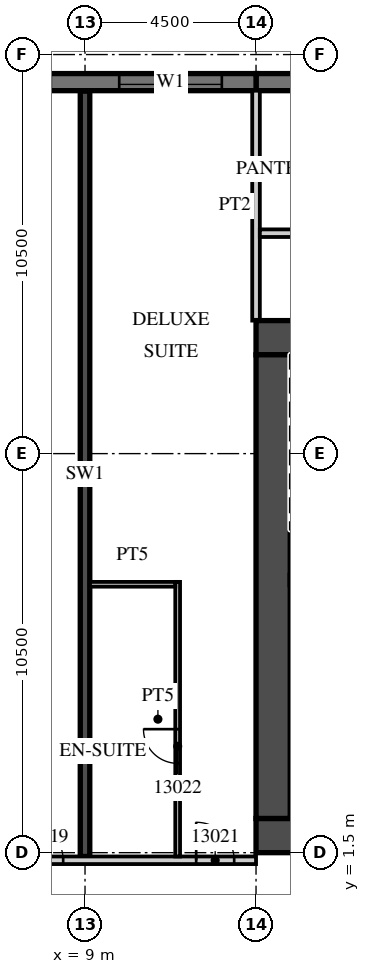
"""IFC4 building model, lengths in metres.
Left out: names, types, materials, properties, quantities, classifications, styles, units other than length and angle.
Written with IfcOpenShell. Run it as: python <this file> out.ifc"""

import sys

from ifc_helpers import new_model, si_unit, direction, frame, frame_2d, origin, place, context, subcontext, project, spatial, rectangle, extrude, element, fill, save


model = new_model("IFC4")
c1 = context("Model", 3, precision=1e-05, world=origin(), true_north=direction((0.0, 1.0)))
c2 = subcontext(c1, "Body", "Model", "MODEL_VIEW")
j1 = project(units=[si_unit("LENGTHUNIT", "METRE"), si_unit("PLANEANGLEUNIT", "RADIAN")], contexts=[c1])
p1 = place(None, origin())
s1 = spatial("IfcSite", under=j1, at=p1, CompositionType="ELEMENT")
p2 = place(p1, origin())
s2 = spatial("IfcBuilding", under=s1, at=p2, CompositionType="ELEMENT")
p3 = place(p2, frame((0.0, 0.0, 73.2)))
s3 = spatial("IfcBuildingStorey", under=s2, at=p3, CompositionType="ELEMENT", Elevation=73.2)
p4 = place(p3, frame((9.0, 1.4, 0.0), z_axis=(0.0, 0.0, 1.0), x_axis=(0.0, 1.0, 0.0)))
e1 = element("IfcWall", 1, at=p4, inside=s3, PredefinedType="SHEAR", context=c2, shape_type="SweptSolid", body=[
    extrude(rectangle(XDim=20.14, YDim=0.25, at=frame_2d((10.07, 0.0))), origin(), (0.0, 0.0, 1.0), 3.3),
])
p5 = place(p3, frame((31.5, 21.775, 0.0), z_axis=(0.0, 0.0, 1.0), x_axis=(-1.0, 0.0, 0.0)))
e2 = element("IfcWall", 2, at=p5, inside=s3, PredefinedType="SOLIDWALL", context=c2, shape_type="SweptSolid", body=[
    extrude(rectangle(XDim=18.0, YDim=0.45, at=frame_2d((9.0, 0.0))), origin(), (0.0, 0.0, 1.0), 3.02),
])
p6 = place(p3, frame((13.5, 21.775, 0.0), z_axis=(0.0, 0.0, 1.0), x_axis=(-1.0, 0.0, 0.0)))
e3 = element("IfcWall", 3, at=p6, inside=s3, PredefinedType="SOLIDWALL", context=c2, shape_type="SweptSolid", body=[
    extrude(rectangle(XDim=54.5, YDim=0.45, at=frame_2d((27.25, 0.0))), origin(), (0.0, 0.0, 1.0), 3.02),
])
p7 = place(p6, frame((0.9, 0.0, 0.45)))
e4 = element("IfcOpeningElement", 4, at=p7, cuts=e3, PredefinedType="OPENING", context=c2, shape_type="SweptSolid", body=[
    extrude(rectangle(XDim=2.7, YDim=2.25, at=frame_2d((1.35, 1.125))), frame((0.0, 0.235, 0.0), z_axis=(0.0, -1.0, 0.0), x_axis=(1.0, 0.0, 0.0)), (0.0, 0.0, 1.0), 0.47),
])
p8 = place(p6, frame((5.4, 0.0, 0.45)))
e5 = element("IfcOpeningElement", 5, at=p8, cuts=e3, PredefinedType="OPENING", context=c2, shape_type="SweptSolid", body=[
    extrude(rectangle(XDim=2.7, YDim=2.25, at=frame_2d((1.35, 1.125))), frame((0.0, 0.235, 0.0), z_axis=(0.0, -1.0, 0.0), x_axis=(1.0, 0.0, 0.0)), (0.0, 0.0, 1.0), 0.47),
])
p9 = place(p6, frame((9.9, 0.0, 0.45)))
e6 = element("IfcOpeningElement", 6, at=p9, cuts=e3, PredefinedType="OPENING", context=c2, shape_type="SweptSolid", body=[
    extrude(rectangle(XDim=2.7, YDim=2.25, at=frame_2d((1.35, 1.125))), frame((0.0, 0.235, 0.0), z_axis=(0.0, -1.0, 0.0), x_axis=(1.0, 0.0, 0.0)), (0.0, 0.0, 1.0), 0.47),
])
p10 = place(p6, frame((14.4, 0.0, 0.45)))
e7 = element("IfcOpeningElement", 7, at=p10, cuts=e3, PredefinedType="OPENING", context=c2, shape_type="SweptSolid", body=[
    extrude(rectangle(XDim=2.7, YDim=2.25, at=frame_2d((1.35, 1.125))), frame((0.0, 0.235, 0.0), z_axis=(0.0, -1.0, 0.0), x_axis=(1.0, 0.0, 0.0)), (0.0, 0.0, 1.0), 0.47),
])
p11 = place(p6, frame((18.9, 0.0, 0.45)))
e8 = element("IfcOpeningElement", 8, at=p11, cuts=e3, PredefinedType="OPENING", context=c2, shape_type="SweptSolid", body=[
    extrude(rectangle(XDim=2.7, YDim=2.25, at=frame_2d((1.35, 1.125))), frame((0.0, 0.235, 0.0), z_axis=(0.0, -1.0, 0.0), x_axis=(1.0, 0.0, 0.0)), (0.0, 0.0, 1.0), 0.47),
])
p12 = place(p6, frame((23.4, 0.0, 0.45)))
e9 = element("IfcOpeningElement", 9, at=p12, cuts=e3, PredefinedType="OPENING", context=c2, shape_type="SweptSolid", body=[
    extrude(rectangle(XDim=2.7, YDim=2.25, at=frame_2d((1.35, 1.125))), frame((0.0, 0.235, 0.0), z_axis=(0.0, -1.0, 0.0), x_axis=(1.0, 0.0, 0.0)), (0.0, 0.0, 1.0), 0.47),
])
p13 = place(p6, frame((27.9, 0.0, 0.45)))
e10 = element("IfcOpeningElement", 10, at=p13, cuts=e3, PredefinedType="OPENING", context=c2, shape_type="SweptSolid", body=[
    extrude(rectangle(XDim=2.7, YDim=2.25, at=frame_2d((1.35, 1.125))), frame((0.0, 0.235, 0.0), z_axis=(0.0, -1.0, 0.0), x_axis=(1.0, 0.0, 0.0)), (0.0, 0.0, 1.0), 0.47),
])
p14 = place(p6, frame((32.4, 0.0, 0.45)))
e11 = element("IfcOpeningElement", 11, at=p14, cuts=e3, PredefinedType="OPENING", context=c2, shape_type="SweptSolid", body=[
    extrude(rectangle(XDim=2.7, YDim=2.25, at=frame_2d((1.35, 1.125))), frame((0.0, 0.235, 0.0), z_axis=(0.0, -1.0, 0.0), x_axis=(1.0, 0.0, 0.0)), (0.0, 0.0, 1.0), 0.47),
])
p15 = place(p6, frame((36.9, 0.0, 0.45)))
e12 = element("IfcOpeningElement", 12, at=p15, cuts=e3, PredefinedType="OPENING", context=c2, shape_type="SweptSolid", body=[
    extrude(rectangle(XDim=2.7, YDim=2.25, at=frame_2d((1.35, 1.125))), frame((0.0, 0.235, 0.0), z_axis=(0.0, -1.0, 0.0), x_axis=(1.0, 0.0, 0.0)), (0.0, 0.0, 1.0), 0.47),
])
p16 = place(p6, frame((41.4, 0.0, 0.45)))
e13 = element("IfcOpeningElement", 13, at=p16, cuts=e3, PredefinedType="OPENING", context=c2, shape_type="SweptSolid", body=[
    extrude(rectangle(XDim=2.7, YDim=2.25, at=frame_2d((1.35, 1.125))), frame((0.0, 0.235, 0.0), z_axis=(0.0, -1.0, 0.0), x_axis=(1.0, 0.0, 0.0)), (0.0, 0.0, 1.0), 0.47),
])
p17 = place(p6, frame((45.9, 0.0, 0.45)))
e14 = element("IfcOpeningElement", 14, at=p17, cuts=e3, PredefinedType="OPENING", context=c2, shape_type="SweptSolid", body=[
    extrude(rectangle(XDim=2.7, YDim=2.25, at=frame_2d((1.35, 1.125))), frame((0.0, 0.235, 0.0), z_axis=(0.0, -1.0, 0.0), x_axis=(1.0, 0.0, 0.0)), (0.0, 0.0, 1.0), 0.47),
])
p18 = place(p6, frame((50.4, 0.0, 0.45)))
e15 = element("IfcOpeningElement", 15, at=p18, cuts=e3, PredefinedType="OPENING", context=c2, shape_type="SweptSolid", body=[
    extrude(rectangle(XDim=2.7, YDim=2.25, at=frame_2d((1.35, 1.125))), frame((0.0, 0.235, 0.0), z_axis=(0.0, -1.0, 0.0), x_axis=(1.0, 0.0, 0.0)), (0.0, 0.0, 1.0), 0.47),
])
p19 = place(p3, frame((13.5, 15.5, 0.0), z_axis=(0.0, 0.0, 1.0), x_axis=(0.0, 1.0, 0.0)))
e16 = element("IfcWall", 16, at=p19, inside=s3, PredefinedType="PARTITIONING", context=c2, shape_type="SweptSolid", body=[
    extrude(rectangle(XDim=6.05, YDim=0.2, at=frame_2d((3.025, 0.0))), origin(), (0.0, 0.0, 1.0), 3.02),
])
p20 = place(p3, frame((-44.55, 1.3, 0.0), z_axis=(0.0, 0.0, 1.0), x_axis=(1.0, 0.0, 0.0)))
e17 = element("IfcWall", 17, at=p20, inside=s3, PredefinedType="PARTITIONING", context=c2, shape_type="SweptSolid", body=[
    extrude(rectangle(XDim=58.05, YDim=0.2, at=frame_2d((29.025, 0.0))), origin(), (0.0, 0.0, 1.0), 3.02),
])
p21 = place(p20, frame((0.525, 0.0, 0.0)))
e18 = element("IfcOpeningElement", 18, at=p21, cuts=e17, PredefinedType="OPENING", context=c2, shape_type="SweptSolid", body=[
    extrude(rectangle(XDim=1.0, YDim=2.1, at=frame_2d((0.5, 1.05))), frame((0.0, 0.11, 0.0), z_axis=(0.0, -1.0, 0.0), x_axis=(1.0, 0.0, 0.0)), (0.0, 0.0, 1.0), 0.22),
])
p22 = place(p20, frame((6.975, 0.0, 0.0)))
e19 = element("IfcOpeningElement", 19, at=p22, cuts=e17, PredefinedType="OPENING", context=c2, shape_type="SweptSolid", body=[
    extrude(rectangle(XDim=1.0, YDim=2.1, at=frame_2d((0.5, 1.05))), frame((0.0, 0.11, 0.0), z_axis=(0.0, -1.0, 0.0), x_axis=(1.0, 0.0, 0.0)), (0.0, 0.0, 1.0), 0.22),
])
p23 = place(p20, frame((9.125, 0.0, 0.0)))
e20 = element("IfcOpeningElement", 20, at=p23, cuts=e17, PredefinedType="OPENING", context=c2, shape_type="SweptSolid", body=[
    extrude(rectangle(XDim=1.0, YDim=2.1, at=frame_2d((0.5, 1.05))), frame((0.0, 0.11, 0.0), z_axis=(0.0, -1.0, 0.0), x_axis=(1.0, 0.0, 0.0)), (0.0, 0.0, 1.0), 0.22),
])
p24 = place(p20, frame((13.6, 0.0, 0.0)))
e21 = element("IfcOpeningElement", 21, at=p24, cuts=e17, PredefinedType="OPENING", context=c2, shape_type="SweptSolid", body=[
    extrude(rectangle(XDim=1.0, YDim=2.1, at=frame_2d((0.5, 1.05))), frame((0.0, 0.11, 0.0), z_axis=(0.0, -1.0, 0.0), x_axis=(1.0, 0.0, 0.0)), (0.0, 0.0, 1.0), 0.22),
])
p25 = place(p20, frame((19.987, 0.0, 0.0)))
e22 = element("IfcOpeningElement", 22, at=p25, cuts=e17, PredefinedType="OPENING", context=c2, shape_type="SweptSolid", body=[
    extrude(rectangle(XDim=1.2, YDim=2.1, at=frame_2d((0.6, 1.05))), frame((0.0, 0.11, 0.0), z_axis=(0.0, -1.0, 0.0), x_axis=(1.0, 0.0, 0.0)), (0.0, 0.0, 1.0), 0.22),
])
p26 = place(p20, frame((31.912, 0.0, 0.0)))
e23 = element("IfcOpeningElement", 23, at=p26, cuts=e17, PredefinedType="OPENING", context=c2, shape_type="SweptSolid", body=[
    extrude(rectangle(XDim=1.2, YDim=2.1, at=frame_2d((0.6, 1.05))), frame((0.0, 0.11, 0.0), z_axis=(0.0, -1.0, 0.0), x_axis=(1.0, 0.0, 0.0)), (0.0, 0.0, 1.0), 0.22),
])
p27 = place(p20, frame((38.5, 0.0, 0.0)))
e24 = element("IfcOpeningElement", 24, at=p27, cuts=e17, PredefinedType="OPENING", context=c2, shape_type="SweptSolid", body=[
    extrude(rectangle(XDim=1.0, YDim=2.1, at=frame_2d((0.5, 1.05))), frame((0.0, 0.11, 0.0), z_axis=(0.0, -1.0, 0.0), x_axis=(1.0, 0.0, 0.0)), (0.0, 0.0, 1.0), 0.22),
])
p28 = place(p20, frame((40.6, 0.0, 0.0)))
e25 = element("IfcOpeningElement", 25, at=p28, cuts=e17, PredefinedType="OPENING", context=c2, shape_type="SweptSolid", body=[
    extrude(rectangle(XDim=1.0, YDim=2.1, at=frame_2d((0.5, 1.05))), frame((0.0, 0.11, 0.0), z_axis=(0.0, -1.0, 0.0), x_axis=(1.0, 0.0, 0.0)), (0.0, 0.0, 1.0), 0.22),
])
p29 = place(p20, frame((47.5, 0.0, 0.0)))
e26 = element("IfcOpeningElement", 26, at=p29, cuts=e17, PredefinedType="OPENING", context=c2, shape_type="SweptSolid", body=[
    extrude(rectangle(XDim=1.0, YDim=2.1, at=frame_2d((0.5, 1.05))), frame((0.0, 0.11, 0.0), z_axis=(0.0, -1.0, 0.0), x_axis=(1.0, 0.0, 0.0)), (0.0, 0.0, 1.0), 0.22),
])
p30 = place(p20, frame((51.975, 0.0, 0.0)))
e27 = element("IfcOpeningElement", 27, at=p30, cuts=e17, PredefinedType="OPENING", context=c2, shape_type="SweptSolid", body=[
    extrude(rectangle(XDim=1.0, YDim=2.1, at=frame_2d((0.5, 1.05))), frame((0.0, 0.11, 0.0), z_axis=(0.0, -1.0, 0.0), x_axis=(1.0, 0.0, 0.0)), (0.0, 0.0, 1.0), 0.22),
])
p31 = place(p20, frame((56.475, 0.0, 0.0)))
e28 = element("IfcOpeningElement", 28, at=p31, cuts=e17, PredefinedType="OPENING", context=c2, shape_type="SweptSolid", body=[
    extrude(rectangle(XDim=1.0, YDim=2.1, at=frame_2d((0.5, 1.05))), frame((0.0, 0.11, 0.0), z_axis=(0.0, -1.0, 0.0), x_axis=(1.0, 0.0, 0.0)), (0.0, 0.0, 1.0), 0.22),
])
p32 = place(p3, frame((11.438, 1.4, 0.0), z_axis=(0.0, 0.0, 1.0), x_axis=(0.0, 1.0, 0.0)))
e29 = element("IfcWall", 29, at=p32, inside=s3, PredefinedType="PARTITIONING", context=c2, shape_type="SweptSolid", body=[
    extrude(rectangle(XDim=7.225, YDim=0.125, at=frame_2d((3.613, 0.0))), origin(), (0.0, 0.0, 1.0), 3.02),
])
p33 = place(p32, frame((2.45, 0.0, 0.0)))
e30 = element("IfcOpeningElement", 30, at=p33, cuts=e29, PredefinedType="OPENING", context=c2, shape_type="SweptSolid", body=[
    extrude(rectangle(XDim=0.9, YDim=2.1, at=frame_2d((0.45, 1.05))), frame((0.0, 0.073, 0.0), z_axis=(0.0, -1.0, 0.0), x_axis=(1.0, 0.0, 0.0)), (0.0, 0.0, 1.0), 0.145),
])
p34 = place(p3, frame((9.125, 8.562, 0.0), z_axis=(0.0, 0.0, 1.0), x_axis=(1.0, 0.0, 0.0)))
e31 = element("IfcWall", 31, at=p34, inside=s3, PredefinedType="PARTITIONING", context=c2, shape_type="SweptSolid", body=[
    extrude(rectangle(XDim=2.25, YDim=0.125, at=frame_2d((1.125, 0.0))), origin(), (0.0, 0.0, 1.0), 3.02),
])
p35 = place(p3, frame((13.5, 1.95, 0.0), z_axis=(0.0, 0.0, 1.0), x_axis=(1.0, 0.0, 0.0)))
e32 = element("IfcWall", 32, at=p35, inside=s3, PredefinedType="SHEAR", context=c2, shape_type="SweptSolid", body=[
    extrude(rectangle(XDim=18.0, YDim=0.9, at=frame_2d((9.0, 0.0))), origin(), (0.0, 0.0, 1.0), 3.02),
])
p36 = place(p35, frame((1.475, 0.0, 0.0)))
e33 = element("IfcOpeningElement", 33, at=p36, cuts=e32, PredefinedType="OPENING", context=c2, shape_type="SweptSolid", body=[
    extrude(rectangle(XDim=1.8, YDim=2.1, at=frame_2d((0.9, 1.05))), frame((0.0, 0.46, 0.0), z_axis=(0.0, -1.0, 0.0), x_axis=(1.0, 0.0, 0.0)), (0.0, 0.0, 1.0), 0.92),
])
p37 = place(p3, frame((13.5, 15.05, 0.0), z_axis=(0.0, 0.0, 1.0), x_axis=(1.0, 0.0, 0.0)))
e34 = element("IfcWall", 34, at=p37, inside=s3, PredefinedType="SHEAR", context=c2, shape_type="SweptSolid", body=[
    extrude(rectangle(XDim=6.8, YDim=0.9, at=frame_2d((3.4, 0.0))), origin(), (0.0, 0.0, 1.0), 3.02),
])
p38 = place(p37, frame((4.725, 0.0, 0.0)))
e35 = element("IfcOpeningElement", 35, at=p38, cuts=e34, PredefinedType="OPENING", context=c2, shape_type="SweptSolid", body=[
    extrude(rectangle(XDim=1.2, YDim=2.1, at=frame_2d((0.6, 1.05))), frame((0.0, 0.46, 0.0), z_axis=(0.0, -1.0, 0.0), x_axis=(1.0, 0.0, 0.0)), (0.0, 0.0, 1.0), 0.92),
])
p39 = place(p3, frame((13.95, 2.4, 0.0), z_axis=(0.0, 0.0, 1.0), x_axis=(0.0, 1.0, 0.0)))
e36 = element("IfcWall", 36, at=p39, inside=s3, PredefinedType="SHEAR", context=c2, shape_type="SweptSolid", body=[
    extrude(rectangle(XDim=12.2, YDim=0.9, at=frame_2d((6.1, 0.0))), origin(), (0.0, 0.0, 1.0), 3.02),
])
p40 = place(p3, frame((13.6, 17.8, 0.0), z_axis=(0.0, 0.0, 1.0), x_axis=(1.0, 0.0, 0.0)))
e37 = element("IfcWall", 37, at=p40, inside=s3, PredefinedType="PARTITIONING", context=c2, shape_type="SweptSolid", body=[
    extrude(rectangle(XDim=30.95, YDim=0.2, at=frame_2d((15.475, 0.0))), origin(), (0.0, 0.0, 1.0), 3.02),
])
p41 = place(p40, frame((15.012, 0.0, 0.0)))
e38 = element("IfcOpeningElement", 38, at=p41, cuts=e37, PredefinedType="OPENING", context=c2, shape_type="SweptSolid", body=[
    extrude(rectangle(XDim=0.9, YDim=2.1, at=frame_2d((0.45, 1.05))), frame((0.0, 0.11, 0.0), z_axis=(0.0, -1.0, 0.0), x_axis=(1.0, 0.0, 0.0)), (0.0, 0.0, 1.0), 0.22),
])
p42 = place(p40, frame((6.712, 0.0, 0.0)))
e39 = element("IfcOpeningElement", 39, at=p42, cuts=e37, PredefinedType="OPENING", context=c2, shape_type="SweptSolid", body=[
    extrude(rectangle(XDim=0.9, YDim=2.1, at=frame_2d((0.45, 1.05))), frame((0.0, 0.11, 0.0), z_axis=(0.0, -1.0, 0.0), x_axis=(1.0, 0.0, 0.0)), (0.0, 0.0, 1.0), 0.22),
])
p43 = place(p7, origin())
e40 = element("IfcWindow", 40, at=p43, inside=s3, PartitioningType="SINGLE_PANEL", PredefinedType="WINDOW", context=c2, shape_type="SweptSolid", body=[
    extrude(rectangle(XDim=2.7, YDim=2.25, at=frame_2d((1.35, 1.125))), frame((0.0, 0.09, 0.0), z_axis=(0.0, -1.0, 0.0), x_axis=(1.0, 0.0, 0.0)), (0.0, 0.0, 1.0), 0.06),
])
fill(e4, e40)
p44 = place(p30, origin())
e41 = element("IfcDoor", 41, at=p44, inside=s3, OperationType="SINGLE_SWING_LEFT", PredefinedType="DOOR", context=c2, shape_type="SweptSolid", body=[
    extrude(rectangle(XDim=1.0, YDim=2.1, at=frame_2d((0.5, 1.05))), frame((0.0, 0.025, 0.0), z_axis=(0.0, -1.0, 0.0), x_axis=(1.0, 0.0, 0.0)), (0.0, 0.0, 1.0), 0.05),
])
fill(e27, e41)
p45 = place(p31, origin())
e42 = element("IfcDoor", 42, at=p45, inside=s3, OperationType="SINGLE_SWING_LEFT", PredefinedType="DOOR", context=c2, shape_type="SweptSolid", body=[
    extrude(rectangle(XDim=1.0, YDim=2.1, at=frame_2d((0.5, 1.05))), frame((0.0, 0.025, 0.0), z_axis=(0.0, -1.0, 0.0), x_axis=(1.0, 0.0, 0.0)), (0.0, 0.0, 1.0), 0.05),
])
fill(e28, e42)
p46 = place(p33, origin())
e43 = element("IfcDoor", 43, at=p46, inside=s3, OperationType="SINGLE_SWING_RIGHT", PredefinedType="DOOR", context=c2, shape_type="SweptSolid", body=[
    extrude(rectangle(XDim=0.9, YDim=2.1, at=frame_2d((0.45, 1.05))), frame((0.0, 0.025, 0.0), z_axis=(0.0, -1.0, 0.0), x_axis=(1.0, 0.0, 0.0)), (0.0, 0.0, 1.0), 0.05),
])
fill(e30, e43)
save(model, sys.argv[1])
